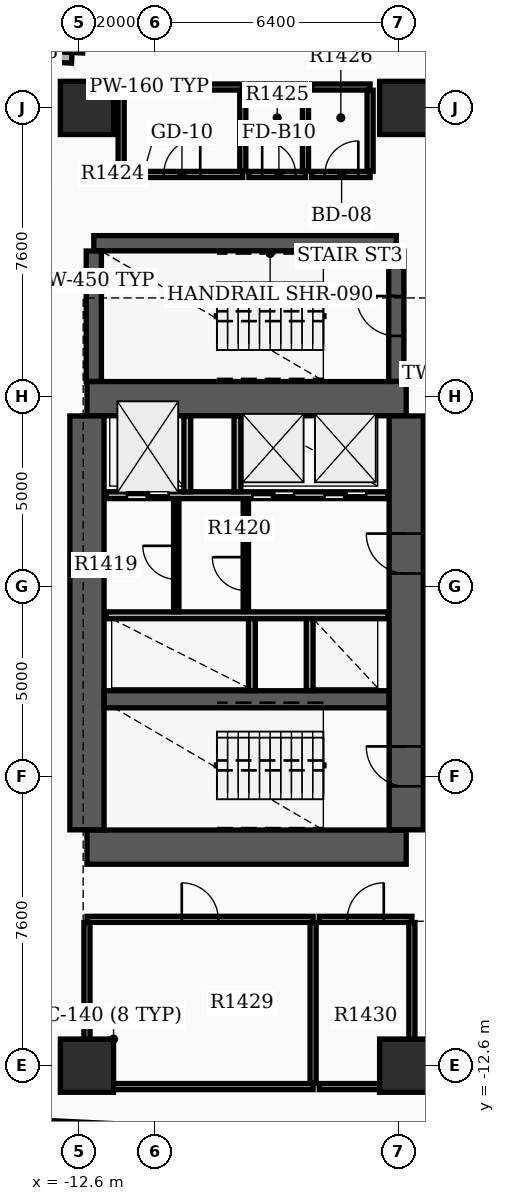
"""IFC4 building model, lengths in metres.
Left out: names, types, materials, properties, quantities, classifications, styles, units other than length and angle.
Written with IfcOpenShell. Run it as: python <this file> out.ifc"""

import sys

from ifc_helpers import new_model, si_unit, direction, frame, frame_2d, origin, origin_2d, place, context, subcontext, project, spatial, rectangle, extrude, element, fill, save


model = new_model("IFC4")
c1 = context("Model", 3, precision=1e-05, world=origin(), true_north=direction((0.0, 1.0)))
c2 = subcontext(c1, "Body", "Model", "MODEL_VIEW")
j1 = project(units=[si_unit("LENGTHUNIT", "METRE"), si_unit("PLANEANGLEUNIT", "RADIAN")], contexts=[c1])
p1 = place(None, origin())
s1 = spatial("IfcSite", under=j1, at=p1, CompositionType="ELEMENT")
p2 = place(p1, origin())
s2 = spatial("IfcBuilding", under=s1, at=p2, CompositionType="ELEMENT")
p3 = place(p2, frame((0.0, 0.0, 91.2)))
s3 = spatial("IfcBuildingStorey", under=s2, at=p3, CompositionType="ELEMENT", Elevation=91.2)
for number, where, z_axis, x_axis in (
    (1, (-12.4, -6.85, 0.0), (0.0, 0.0, 1.0), (1.0, 0.0, 0.0)),
    (2, (-12.4, 4.95, 0.0), (0.0, 0.0, 1.0), (1.0, 0.0, 0.0)),
):
    element("IfcWall", number, at=place(p3, frame(where, z_axis=z_axis, x_axis=x_axis)), inside=s3, PredefinedType="SHEAR", context=c2, shape_type="SweptSolid", body=[
        extrude(rectangle(XDim=8.4, YDim=0.9, at=frame_2d((4.2, 0.0))), origin(), (0.0, 0.0, 1.0), 3.65),
    ])
p4 = place(p3, frame((-12.4, -6.395, 0.0), z_axis=(0.0, 0.0, 1.0), x_axis=(0.0, 1.0, 0.0)))
e3 = element("IfcWall", 3, at=p4, inside=s3, PredefinedType="SHEAR", context=c2, shape_type="SweptSolid", body=[
    extrude(rectangle(XDim=10.89, YDim=0.9, at=frame_2d((5.445, 0.0))), origin(), (0.0, 0.0, 1.0), 3.65),
])
p5 = place(p3, frame((-4.0, -6.395, 0.0), z_axis=(0.0, 0.0, 1.0), x_axis=(0.0, 1.0, 0.0)))
e4 = element("IfcWall", 4, at=p5, inside=s3, PredefinedType="SHEAR", context=c2, shape_type="SweptSolid", body=[
    extrude(rectangle(XDim=10.89, YDim=0.9, at=frame_2d((5.445, 0.0))), origin(), (0.0, 0.0, 1.0), 3.65),
])
p6 = place(p5, frame((1.145, 0.0, 0.0)))
e5 = element("IfcOpeningElement", 5, at=p6, cuts=e4, PredefinedType="OPENING", context=c2, shape_type="SweptSolid", body=[
    extrude(rectangle(XDim=1.05, YDim=2.15, at=frame_2d((0.525, 1.075))), frame((0.0, 0.46, 0.0), z_axis=(0.0, -1.0, 0.0), x_axis=(1.0, 0.0, 0.0)), (0.0, 0.0, 1.0), 0.92),
])
p7 = place(p5, frame((6.745, 0.0, 0.0)))
e6 = element("IfcOpeningElement", 6, at=p7, cuts=e4, PredefinedType="OPENING", context=c2, shape_type="SweptSolid", body=[
    extrude(rectangle(XDim=1.05, YDim=2.15, at=frame_2d((0.525, 1.075))), frame((0.0, 0.46, 0.0), z_axis=(0.0, -1.0, 0.0), x_axis=(1.0, 0.0, 0.0)), (0.0, 0.0, 1.0), 0.92),
])
p8 = place(p3, frame((-11.945, -2.96, 0.0), z_axis=(0.0, 0.0, 1.0), x_axis=(1.0, 0.0, 0.0)))
e7 = element("IfcWall", 7, at=p8, inside=s3, PredefinedType="SHEAR", context=c2, shape_type="SweptSolid", body=[
    extrude(rectangle(XDim=7.49, YDim=0.45, at=frame_2d((3.745, 0.0))), origin(), (0.0, 0.0, 1.0), 3.65),
])
p9 = place(p3, frame((-12.22, 9.04, 0.0), z_axis=(0.0, 0.0, 1.0), x_axis=(1.0, 0.0, 0.0)))
e8 = element("IfcWall", 8, at=p9, inside=s3, PredefinedType="SHEAR", context=c2, shape_type="SweptSolid", body=[
    extrude(rectangle(XDim=7.96, YDim=0.4, at=frame_2d((3.98, 0.0))), origin(), (0.0, 0.0, 1.0), 3.65),
])
p10 = place(p3, frame((-12.22, 5.405, 0.0), z_axis=(0.0, 0.0, 1.0), x_axis=(0.0, 1.0, 0.0)))
e9 = element("IfcWall", 9, at=p10, inside=s3, PredefinedType="SHEAR", context=c2, shape_type="SweptSolid", body=[
    extrude(rectangle(XDim=3.43, YDim=0.4, at=frame_2d((1.715, 0.0))), origin(), (0.0, 0.0, 1.0), 3.65),
])
p11 = place(p3, frame((-4.26, 5.405, 0.0), z_axis=(0.0, 0.0, 1.0), x_axis=(0.0, 1.0, 0.0)))
e10 = element("IfcWall", 10, at=p11, inside=s3, PredefinedType="SHEAR", context=c2, shape_type="SweptSolid", body=[
    extrude(rectangle(XDim=3.43, YDim=0.4, at=frame_2d((1.715, 0.0))), origin(), (0.0, 0.0, 1.0), 3.65),
])
p12 = place(p11, frame((1.195, 0.0, 0.0)))
e11 = element("IfcOpeningElement", 11, at=p12, cuts=e10, PredefinedType="OPENING", context=c2, shape_type="SweptSolid", body=[
    extrude(rectangle(XDim=1.05, YDim=2.15, at=frame_2d((0.525, 1.075))), frame((0.0, 0.21, 0.0), z_axis=(0.0, -1.0, 0.0), x_axis=(1.0, 0.0, 0.0)), (0.0, 0.0, 1.0), 0.42),
])
for number, where, z_axis, x_axis in (
    (12, (-12.4, -12.6, 0.0), (0.0, 0.0, 1.0), (1.0, 0.0, 0.0)),
    (13, (-12.4, 12.6, 0.0), (0.0, 0.0, 1.0), (1.0, 0.0, 0.0)),
    (14, (-4.0, -12.6, 0.0), (0.0, 0.0, 1.0), (1.0, 0.0, 0.0)),
    (15, (-4.0, 12.6, 0.0), (0.0, 0.0, 1.0), (1.0, 0.0, 0.0)),
):
    element("IfcColumn", number, at=place(p3, frame(where, z_axis=z_axis, x_axis=x_axis)), inside=s3, PredefinedType="COLUMN", context=c2, shape_type="SweptSolid", body=[
        extrude(rectangle(XDim=1.4, YDim=1.4, at=origin_2d()), origin(), (0.0, 0.0, 1.0), 3.9),
    ])
p13 = place(p3, frame((-14.017, 13.976, 0.0), z_axis=(0.0, 0.0, 1.0), x_axis=(0.998883930236, -0.047232339719, 0.0)))
e16 = element("IfcWall", 16, at=p13, inside=s3, PredefinedType="STANDARD", context=c2, shape_type="SweptSolid", body=[
    extrude(rectangle(XDim=1.22, YDim=0.28, at=frame_2d((0.61, 0.0))), origin(), (0.0, 0.0, 1.0), 2.86),
])
p14 = place(p3, frame((-12.652, 14.052, 0.0), z_axis=(0.0, 0.0, 1.0), x_axis=(0.047039284441, 0.99889304018, 0.0)))
e17 = element("IfcWall", 17, at=p14, inside=s3, PredefinedType="STANDARD", context=c2, shape_type="SweptSolid", body=[
    extrude(rectangle(XDim=1.5, YDim=0.28, at=frame_2d((0.75, 0.0))), origin(), (0.0, 0.0, 1.0), 2.86),
])
p15 = place(p3, frame((-13.843, -14.164, 0.0), z_axis=(0.0, 0.0, 1.0), x_axis=(0.998889082162, -0.047123258997, 0.0)))
e18 = element("IfcWall", 18, at=p15, inside=s3, PredefinedType="STANDARD", context=c2, shape_type="SweptSolid", body=[
    extrude(rectangle(XDim=6.3, YDim=0.28, at=frame_2d((3.15, 0.0))), origin(), (0.0, 0.0, 1.0), 2.86),
])
p16 = place(p3, frame((-11.9, 2.41, 0.0), z_axis=(0.0, 0.0, 1.0), x_axis=(1.0, 0.0, 0.0)))
e19 = element("IfcWall", 19, at=p16, inside=s3, PredefinedType="SOLIDWALL", context=c2, shape_type="SweptSolid", body=[
    extrude(rectangle(XDim=7.42, YDim=0.18, at=frame_2d((3.71, 0.0))), origin(), (0.0, 0.0, 1.0), 2.85),
])
p17 = place(p16, frame((0.55, 0.0, 0.0)))
e20 = element("IfcOpeningElement", 20, at=p17, cuts=e19, PredefinedType="OPENING", context=c2, shape_type="SweptSolid", body=[
    extrude(rectangle(XDim=1.1, YDim=2.15, at=frame_2d((0.55, 1.075))), frame((0.0, 0.1, 0.0), z_axis=(0.0, -1.0, 0.0), x_axis=(1.0, 0.0, 0.0)), (0.0, 0.0, 1.0), 0.2),
])
p18 = place(p16, frame((3.85, 0.0, 0.0)))
e21 = element("IfcOpeningElement", 21, at=p18, cuts=e19, PredefinedType="OPENING", context=c2, shape_type="SweptSolid", body=[
    extrude(rectangle(XDim=1.1, YDim=2.15, at=frame_2d((0.55, 1.075))), frame((0.0, 0.1, 0.0), z_axis=(0.0, -1.0, 0.0), x_axis=(1.0, 0.0, 0.0)), (0.0, 0.0, 1.0), 0.2),
])
p19 = place(p16, frame((5.75, 0.0, 0.0)))
e22 = element("IfcOpeningElement", 22, at=p19, cuts=e19, PredefinedType="OPENING", context=c2, shape_type="SweptSolid", body=[
    extrude(rectangle(XDim=1.1, YDim=2.15, at=frame_2d((0.55, 1.075))), frame((0.0, 0.1, 0.0), z_axis=(0.0, -1.0, 0.0), x_axis=(1.0, 0.0, 0.0)), (0.0, 0.0, 1.0), 0.2),
])
p20 = place(p3, frame((-11.9, -0.75, 0.0), z_axis=(0.0, 0.0, 1.0), x_axis=(1.0, 0.0, 0.0)))
e23 = element("IfcWall", 23, at=p20, inside=s3, PredefinedType="SOLIDWALL", context=c2, shape_type="SweptSolid", body=[
    extrude(rectangle(XDim=7.42, YDim=0.18, at=frame_2d((3.71, 0.0))), origin(), (0.0, 0.0, 1.0), 2.85),
])
for number, where, z_axis, x_axis in (
    (24, (-9.76, 2.5, 0.0), (0.0, 0.0, 1.0), (0.0, 1.0, 0.0)),
    (25, (-8.44, 2.5, 0.0), (0.0, 0.0, 1.0), (0.0, 1.0, 0.0)),
):
    element("IfcWall", number, at=place(p3, frame(where, z_axis=z_axis, x_axis=x_axis)), inside=s3, PredefinedType="SOLIDWALL", context=c2, shape_type="SweptSolid", body=[
        extrude(rectangle(XDim=1.99, YDim=0.18, at=frame_2d((0.995, 0.0))), origin(), (0.0, 0.0, 1.0), 2.85),
    ])
for number, where, z_axis, x_axis in (
    (26, (-8.06, -2.73, 0.0), (0.0, 0.0, 1.0), (0.0, 1.0, 0.0)),
    (27, (-6.54, -2.73, 0.0), (0.0, 0.0, 1.0), (0.0, 1.0, 0.0)),
):
    element("IfcWall", number, at=place(p3, frame(where, z_axis=z_axis, x_axis=x_axis)), inside=s3, PredefinedType="SOLIDWALL", context=c2, shape_type="SweptSolid", body=[
        extrude(rectangle(XDim=1.89, YDim=0.18, at=frame_2d((0.945, 0.0))), origin(), (0.0, 0.0, 1.0), 2.85),
    ])
p21 = place(p3, frame((-8.22, -0.65, 0.0), z_axis=(0.0, 0.0, 1.0), x_axis=(0.0, 1.0, 0.0)))
e28 = element("IfcWall", 28, at=p21, inside=s3, PredefinedType="SOLIDWALL", context=c2, shape_type="SweptSolid", body=[
    extrude(rectangle(XDim=2.96, YDim=0.14, at=frame_2d((1.48, 0.0))), origin(), (0.0, 0.0, 1.0), 2.85),
])
p22 = place(p21, frame((0.55, 0.0, 0.0)))
e29 = element("IfcOpeningElement", 29, at=p22, cuts=e28, PredefinedType="OPENING", context=c2, shape_type="SweptSolid", body=[
    extrude(rectangle(XDim=0.88, YDim=2.1, at=frame_2d((0.44, 1.05))), frame((0.0, 0.08, 0.0), z_axis=(0.0, -1.0, 0.0), x_axis=(1.0, 0.0, 0.0)), (0.0, 0.0, 1.0), 0.16),
])
p23 = place(p3, frame((-10.05, -0.652, 0.0), z_axis=(0.0, 0.0, 1.0), x_axis=(0.0, 1.0, 0.0)))
e30 = element("IfcWall", 30, at=p23, inside=s3, PredefinedType="PARTITIONING", context=c2, shape_type="SweptSolid", body=[
    extrude(rectangle(XDim=2.962, YDim=0.14, at=frame_2d((1.481, 0.0))), origin(), (0.0, 0.0, 1.0), 2.85),
])
p24 = place(p23, frame((0.85, 0.0, 0.0)))
e31 = element("IfcOpeningElement", 31, at=p24, cuts=e30, PredefinedType="OPENING", context=c2, shape_type="SweptSolid", body=[
    extrude(rectangle(XDim=0.88, YDim=2.1, at=frame_2d((0.44, 1.05))), frame((0.0, 0.08, 0.0), z_axis=(0.0, -1.0, 0.0), x_axis=(1.0, 0.0, 0.0)), (0.0, 0.0, 1.0), 0.16),
])
p25 = place(p3, frame((-11.5, 10.85, 0.0), z_axis=(0.0, 0.0, 1.0), x_axis=(1.0, 0.0, 0.0)))
e32 = element("IfcWall", 32, at=p25, inside=s3, PredefinedType="PARTITIONING", context=c2, shape_type="SweptSolid", body=[
    extrude(rectangle(XDim=3.2, YDim=0.16, at=frame_2d((1.6, 0.0))), origin(), (0.0, 0.0, 1.0), 2.85),
])
p26 = place(p25, frame((1.12, 0.0, 0.0)))
e33 = element("IfcOpeningElement", 33, at=p26, cuts=e32, PredefinedType="OPENING", context=c2, shape_type="SweptSolid", body=[
    extrude(rectangle(XDim=0.96, YDim=2.15, at=frame_2d((0.48, 1.075))), frame((0.0, 0.09, 0.0), z_axis=(0.0, -1.0, 0.0), x_axis=(1.0, 0.0, 0.0)), (0.0, 0.0, 1.0), 0.18),
])
p27 = place(p3, frame((-11.5, 13.15, 0.0), z_axis=(0.0, 0.0, 1.0), x_axis=(1.0, 0.0, 0.0)))
e34 = element("IfcWall", 34, at=p27, inside=s3, PredefinedType="PARTITIONING", context=c2, shape_type="SweptSolid", body=[
    extrude(rectangle(XDim=3.2, YDim=0.16, at=frame_2d((1.6, 0.0))), origin(), (0.0, 0.0, 1.0), 2.85),
])
for number, where, z_axis, x_axis in (
    (35, (-11.5, 10.935, 0.0), (0.0, 0.0, 1.0), (0.0, 1.0, 0.0)),
    (36, (-8.3, 10.935, 0.0), (0.0, 0.0, 1.0), (0.0, 1.0, 0.0)),
):
    element("IfcWall", number, at=place(p3, frame(where, z_axis=z_axis, x_axis=x_axis)), inside=s3, PredefinedType="PARTITIONING", context=c2, shape_type="SweptSolid", body=[
        extrude(rectangle(XDim=2.13, YDim=0.16, at=frame_2d((1.065, 0.0))), origin(), (0.0, 0.0, 1.0), 2.85),
    ])
p28 = place(p3, frame((-8.14, 10.85, 0.0), z_axis=(0.0, 0.0, 1.0), x_axis=(1.0, 0.0, 0.0)))
e37 = element("IfcWall", 37, at=p28, inside=s3, PredefinedType="PARTITIONING", context=c2, shape_type="SweptSolid", body=[
    extrude(rectangle(XDim=1.49, YDim=0.16, at=frame_2d((0.745, 0.0))), origin(), (0.0, 0.0, 1.0), 2.85),
])
p29 = place(p28, frame((0.35, 0.0, 0.0)))
e38 = element("IfcOpeningElement", 38, at=p29, cuts=e37, PredefinedType="OPENING", context=c2, shape_type="SweptSolid", body=[
    extrude(rectangle(XDim=0.88, YDim=2.1, at=frame_2d((0.44, 1.05))), frame((0.0, 0.09, 0.0), z_axis=(0.0, -1.0, 0.0), x_axis=(1.0, 0.0, 0.0)), (0.0, 0.0, 1.0), 0.18),
])
p30 = place(p3, frame((-8.14, 13.15, 0.0), z_axis=(0.0, 0.0, 1.0), x_axis=(1.0, 0.0, 0.0)))
e39 = element("IfcWall", 39, at=p30, inside=s3, PredefinedType="PARTITIONING", context=c2, shape_type="SweptSolid", body=[
    extrude(rectangle(XDim=1.49, YDim=0.16, at=frame_2d((0.745, 0.0))), origin(), (0.0, 0.0, 1.0), 2.85),
])
p31 = place(p3, frame((-6.65, 10.935, 0.0), z_axis=(0.0, 0.0, 1.0), x_axis=(0.0, 1.0, 0.0)))
e40 = element("IfcWall", 40, at=p31, inside=s3, PredefinedType="PARTITIONING", context=c2, shape_type="SweptSolid", body=[
    extrude(rectangle(XDim=2.13, YDim=0.16, at=frame_2d((1.065, 0.0))), origin(), (0.0, 0.0, 1.0), 2.85),
])
p32 = place(p3, frame((-6.49, 10.85, 0.0), z_axis=(0.0, 0.0, 1.0), x_axis=(1.0, 0.0, 0.0)))
e41 = element("IfcWall", 41, at=p32, inside=s3, PredefinedType="PARTITIONING", context=c2, shape_type="SweptSolid", body=[
    extrude(rectangle(XDim=1.54, YDim=0.16, at=frame_2d((0.77, 0.0))), origin(), (0.0, 0.0, 1.0), 2.85),
])
p33 = place(p32, frame((0.35, 0.0, 0.0)))
e42 = element("IfcOpeningElement", 42, at=p33, cuts=e41, PredefinedType="OPENING", context=c2, shape_type="SweptSolid", body=[
    extrude(rectangle(XDim=0.88, YDim=2.15, at=frame_2d((0.44, 1.075))), frame((0.0, 0.09, 0.0), z_axis=(0.0, -1.0, 0.0), x_axis=(1.0, 0.0, 0.0)), (0.0, 0.0, 1.0), 0.18),
])
p34 = place(p3, frame((-6.49, 13.15, 0.0), z_axis=(0.0, 0.0, 1.0), x_axis=(1.0, 0.0, 0.0)))
e43 = element("IfcWall", 43, at=p34, inside=s3, PredefinedType="PARTITIONING", context=c2, shape_type="SweptSolid", body=[
    extrude(rectangle(XDim=1.54, YDim=0.16, at=frame_2d((0.77, 0.0))), origin(), (0.0, 0.0, 1.0), 2.85),
])
p35 = place(p3, frame((-4.95, 10.935, 0.0), z_axis=(0.0, 0.0, 1.0), x_axis=(0.0, 1.0, 0.0)))
e44 = element("IfcWall", 44, at=p35, inside=s3, PredefinedType="PARTITIONING", context=c2, shape_type="SweptSolid", body=[
    extrude(rectangle(XDim=2.13, YDim=0.16, at=frame_2d((1.065, 0.0))), origin(), (0.0, 0.0, 1.0), 2.85),
])
p36 = place(p3, frame((-12.4, -13.15, 0.0), z_axis=(0.0, 0.0, 1.0), x_axis=(1.0, 0.0, 0.0)))
e45 = element("IfcWall", 45, at=p36, inside=s3, PredefinedType="PARTITIONING", context=c2, shape_type="SweptSolid", body=[
    extrude(rectangle(XDim=5.95, YDim=0.16, at=frame_2d((2.975, 0.0))), origin(), (0.0, 0.0, 1.0), 2.85),
])
p37 = place(p3, frame((-12.4, -8.75, 0.0), z_axis=(0.0, 0.0, 1.0), x_axis=(1.0, 0.0, 0.0)))
e46 = element("IfcWall", 46, at=p37, inside=s3, PredefinedType="PARTITIONING", context=c2, shape_type="SweptSolid", body=[
    extrude(rectangle(XDim=5.95, YDim=0.16, at=frame_2d((2.975, 0.0))), origin(), (0.0, 0.0, 1.0), 2.85),
])
p38 = place(p37, frame((2.495, 0.0, 0.0)))
e47 = element("IfcOpeningElement", 47, at=p38, cuts=e46, PredefinedType="OPENING", context=c2, shape_type="SweptSolid", body=[
    extrude(rectangle(XDim=0.96, YDim=2.15, at=frame_2d((0.48, 1.075))), frame((0.0, 0.09, 0.0), z_axis=(0.0, -1.0, 0.0), x_axis=(1.0, 0.0, 0.0)), (0.0, 0.0, 1.0), 0.18),
])
for number, where, z_axis, x_axis in (
    (48, (-12.4, -13.065, 0.0), (0.0, 0.0, 1.0), (0.0, 1.0, 0.0)),
    (49, (-6.45, -13.065, 0.0), (0.0, 0.0, 1.0), (0.0, 1.0, 0.0)),
):
    element("IfcWall", number, at=place(p3, frame(where, z_axis=z_axis, x_axis=x_axis)), inside=s3, PredefinedType="PARTITIONING", context=c2, shape_type="SweptSolid", body=[
        extrude(rectangle(XDim=4.23, YDim=0.16, at=frame_2d((2.115, 0.0))), origin(), (0.0, 0.0, 1.0), 2.85),
    ])
p39 = place(p3, frame((-6.29, -13.15, 0.0), z_axis=(0.0, 0.0, 1.0), x_axis=(1.0, 0.0, 0.0)))
e50 = element("IfcWall", 50, at=p39, inside=s3, PredefinedType="PARTITIONING", context=c2, shape_type="SweptSolid", body=[
    extrude(rectangle(XDim=2.44, YDim=0.16, at=frame_2d((1.22, 0.0))), origin(), (0.0, 0.0, 1.0), 2.85),
])
p40 = place(p3, frame((-6.29, -8.75, 0.0), z_axis=(0.0, 0.0, 1.0), x_axis=(1.0, 0.0, 0.0)))
e51 = element("IfcWall", 51, at=p40, inside=s3, PredefinedType="PARTITIONING", context=c2, shape_type="SweptSolid", body=[
    extrude(rectangle(XDim=2.44, YDim=0.16, at=frame_2d((1.22, 0.0))), origin(), (0.0, 0.0, 1.0), 2.85),
])
p41 = place(p40, frame((0.74, 0.0, 0.0)))
e52 = element("IfcOpeningElement", 52, at=p41, cuts=e51, PredefinedType="OPENING", context=c2, shape_type="SweptSolid", body=[
    extrude(rectangle(XDim=0.96, YDim=2.15, at=frame_2d((0.48, 1.075))), frame((0.0, 0.09, 0.0), z_axis=(0.0, -1.0, 0.0), x_axis=(1.0, 0.0, 0.0)), (0.0, 0.0, 1.0), 0.18),
])
p42 = place(p3, frame((-3.85, -13.065, 0.0), z_axis=(0.0, 0.0, 1.0), x_axis=(0.0, 1.0, 0.0)))
e53 = element("IfcWall", 53, at=p42, inside=s3, PredefinedType="PARTITIONING", context=c2, shape_type="SweptSolid", body=[
    extrude(rectangle(XDim=4.23, YDim=0.16, at=frame_2d((2.115, 0.0))), origin(), (0.0, 0.0, 1.0), 2.85),
])
p43 = place(p6, origin())
e54 = element("IfcDoor", 54, at=p43, inside=s3, OperationType="SINGLE_SWING_RIGHT", PredefinedType="DOOR", context=c2, shape_type="SweptSolid", body=[
    extrude(rectangle(XDim=1.05, YDim=2.15, at=frame_2d((0.525, 1.075))), frame((0.0, 0.025, 0.0), z_axis=(0.0, -1.0, 0.0), x_axis=(1.0, 0.0, 0.0)), (0.0, 0.0, 1.0), 0.05),
])
fill(e5, e54)
p44 = place(p7, origin())
e55 = element("IfcDoor", 55, at=p44, inside=s3, OperationType="SINGLE_SWING_RIGHT", PredefinedType="DOOR", context=c2, shape_type="SweptSolid", body=[
    extrude(rectangle(XDim=1.05, YDim=2.15, at=frame_2d((0.525, 1.075))), frame((0.0, 0.025, 0.0), z_axis=(0.0, -1.0, 0.0), x_axis=(1.0, 0.0, 0.0)), (0.0, 0.0, 1.0), 0.05),
])
fill(e6, e55)
p45 = place(p12, origin())
e56 = element("IfcDoor", 56, at=p45, inside=s3, OperationType="SINGLE_SWING_RIGHT", PredefinedType="DOOR", context=c2, shape_type="SweptSolid", body=[
    extrude(rectangle(XDim=1.05, YDim=2.15, at=frame_2d((0.525, 1.075))), frame((0.0, 0.025, 0.0), z_axis=(0.0, -1.0, 0.0), x_axis=(1.0, 0.0, 0.0)), (0.0, 0.0, 1.0), 0.05),
])
fill(e11, e56)
p46 = place(p17, origin())
e57 = element("IfcDoor", 57, at=p46, inside=s3, OperationType="DOUBLE_DOOR_SLIDING", PredefinedType="DOOR", context=c2, shape_type="SweptSolid", body=[
    extrude(rectangle(XDim=1.1, YDim=2.15, at=frame_2d((0.55, 1.075))), frame((0.0, 0.025, 0.0), z_axis=(0.0, -1.0, 0.0), x_axis=(1.0, 0.0, 0.0)), (0.0, 0.0, 1.0), 0.05),
])
fill(e20, e57)
p47 = place(p18, origin())
e58 = element("IfcDoor", 58, at=p47, inside=s3, OperationType="DOUBLE_DOOR_SLIDING", PredefinedType="DOOR", context=c2, shape_type="SweptSolid", body=[
    extrude(rectangle(XDim=1.1, YDim=2.15, at=frame_2d((0.55, 1.075))), frame((0.0, 0.025, 0.0), z_axis=(0.0, -1.0, 0.0), x_axis=(1.0, 0.0, 0.0)), (0.0, 0.0, 1.0), 0.05),
])
fill(e21, e58)
p48 = place(p19, origin())
e59 = element("IfcDoor", 59, at=p48, inside=s3, OperationType="DOUBLE_DOOR_SLIDING", PredefinedType="DOOR", context=c2, shape_type="SweptSolid", body=[
    extrude(rectangle(XDim=1.1, YDim=2.15, at=frame_2d((0.55, 1.075))), frame((0.0, 0.025, 0.0), z_axis=(0.0, -1.0, 0.0), x_axis=(1.0, 0.0, 0.0)), (0.0, 0.0, 1.0), 0.05),
])
fill(e22, e59)
p49 = place(p22, origin())
e60 = element("IfcDoor", 60, at=p49, inside=s3, OperationType="SINGLE_SWING_RIGHT", PredefinedType="DOOR", context=c2, shape_type="SweptSolid", body=[
    extrude(rectangle(XDim=0.88, YDim=2.1, at=frame_2d((0.44, 1.05))), frame((0.0, 0.025, 0.0), z_axis=(0.0, -1.0, 0.0), x_axis=(1.0, 0.0, 0.0)), (0.0, 0.0, 1.0), 0.05),
])
fill(e29, e60)
p50 = place(p24, origin())
e61 = element("IfcDoor", 61, at=p50, inside=s3, OperationType="SINGLE_SWING_RIGHT", PredefinedType="DOOR", context=c2, shape_type="SweptSolid", body=[
    extrude(rectangle(XDim=0.88, YDim=2.1, at=frame_2d((0.44, 1.05))), frame((0.0, 0.025, 0.0), z_axis=(0.0, -1.0, 0.0), x_axis=(1.0, 0.0, 0.0)), (0.0, 0.0, 1.0), 0.05),
])
fill(e31, e61)
p51 = place(p26, origin())
e62 = element("IfcDoor", 62, at=p51, inside=s3, OperationType="SINGLE_SWING_RIGHT", PredefinedType="DOOR", context=c2, shape_type="SweptSolid", body=[
    extrude(rectangle(XDim=0.96, YDim=2.15, at=frame_2d((0.48, 1.075))), frame((0.0, 0.025, 0.0), z_axis=(0.0, -1.0, 0.0), x_axis=(1.0, 0.0, 0.0)), (0.0, 0.0, 1.0), 0.05),
])
fill(e33, e62)
p52 = place(p29, origin())
e63 = element("IfcDoor", 63, at=p52, inside=s3, OperationType="SINGLE_SWING_LEFT", PredefinedType="DOOR", context=c2, shape_type="SweptSolid", body=[
    extrude(rectangle(XDim=0.88, YDim=2.1, at=frame_2d((0.44, 1.05))), frame((0.0, 0.025, 0.0), z_axis=(0.0, -1.0, 0.0), x_axis=(1.0, 0.0, 0.0)), (0.0, 0.0, 1.0), 0.05),
])
fill(e38, e63)
p53 = place(p33, origin())
e64 = element("IfcDoor", 64, at=p53, inside=s3, OperationType="SINGLE_SWING_RIGHT", PredefinedType="DOOR", context=c2, shape_type="SweptSolid", body=[
    extrude(rectangle(XDim=0.88, YDim=2.15, at=frame_2d((0.44, 1.075))), frame((0.0, 0.025, 0.0), z_axis=(0.0, -1.0, 0.0), x_axis=(1.0, 0.0, 0.0)), (0.0, 0.0, 1.0), 0.05),
])
fill(e42, e64)
p54 = place(p38, origin())
e65 = element("IfcDoor", 65, at=p54, inside=s3, OperationType="SINGLE_SWING_LEFT", PredefinedType="DOOR", context=c2, shape_type="SweptSolid", body=[
    extrude(rectangle(XDim=0.96, YDim=2.15, at=frame_2d((0.48, 1.075))), frame((0.0, 0.025, 0.0), z_axis=(0.0, -1.0, 0.0), x_axis=(1.0, 0.0, 0.0)), (0.0, 0.0, 1.0), 0.05),
])
fill(e47, e65)
p55 = place(p41, origin())
e66 = element("IfcDoor", 66, at=p55, inside=s3, OperationType="SINGLE_SWING_RIGHT", PredefinedType="DOOR", context=c2, shape_type="SweptSolid", body=[
    extrude(rectangle(XDim=0.96, YDim=2.15, at=frame_2d((0.48, 1.075))), frame((0.0, 0.025, 0.0), z_axis=(0.0, -1.0, 0.0), x_axis=(1.0, 0.0, 0.0)), (0.0, 0.0, 1.0), 0.05),
])
fill(e52, e66)
save(model, sys.argv[1])
